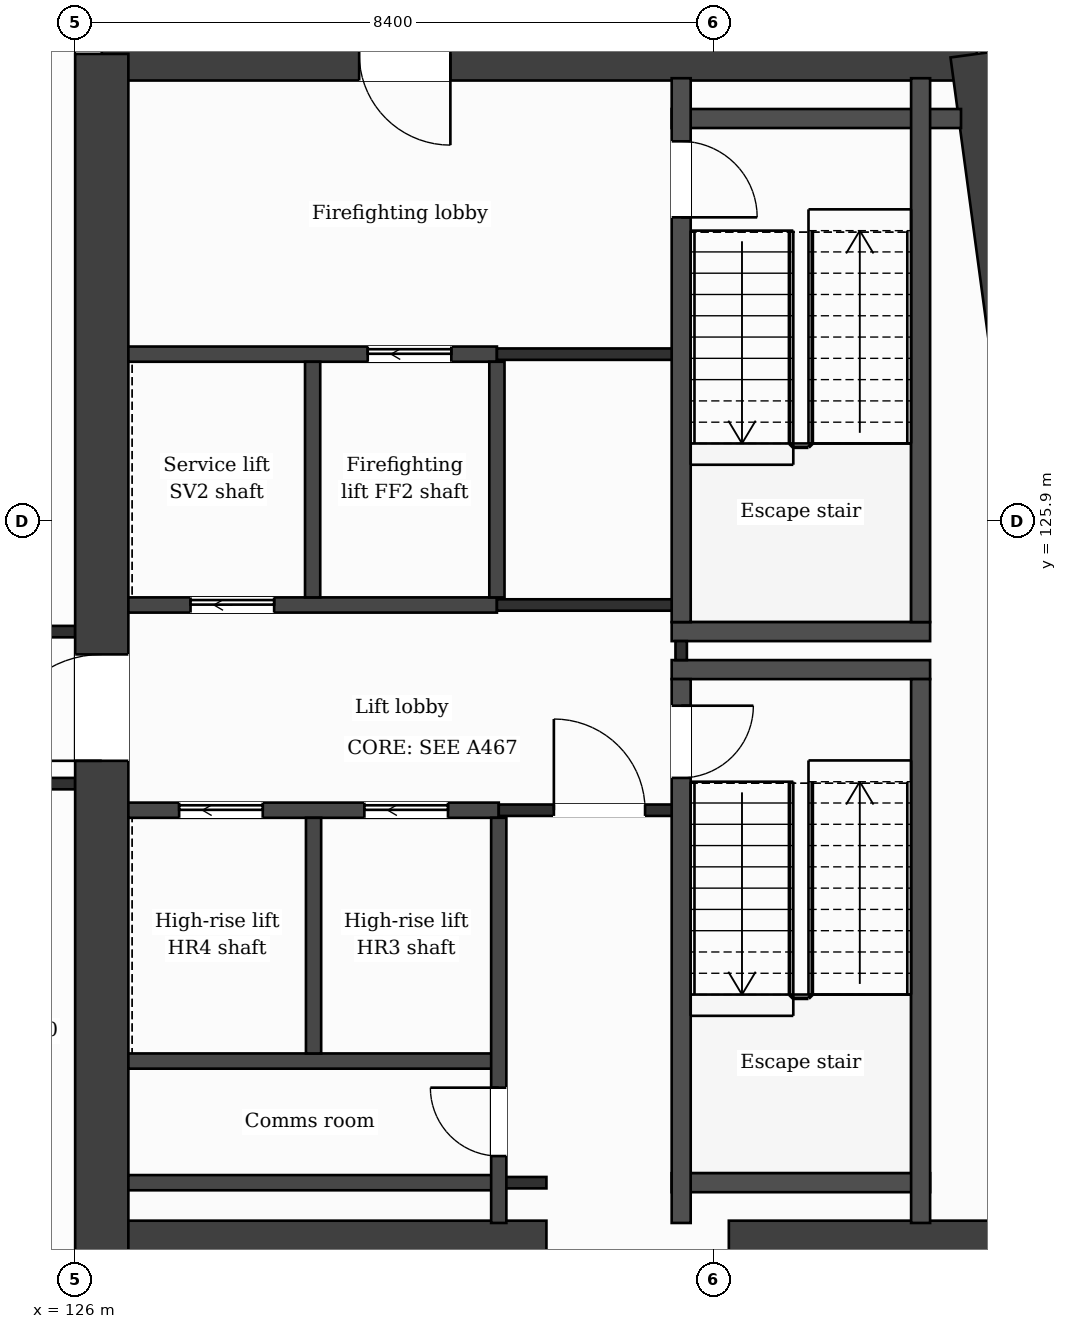
"""IFC4 building model, lengths in metres.
Left out: names, types, materials, properties, quantities, classifications, styles, units other than length and angle.
Written with IfcOpenShell. Run it as: python <this file> out.ifc"""

import sys

from ifc_helpers import new_model, si_unit, direction, frame, frame_2d, origin, place, context, subcontext, project, spatial, rectangle, extrude, element, fill, save


model = new_model("IFC4")
c1 = context("Model", 3, precision=1e-05, world=origin(), true_north=direction((0.0, 1.0)))
c2 = subcontext(c1, "Body", "Model", "MODEL_VIEW")
j1 = project(units=[si_unit("LENGTHUNIT", "METRE"), si_unit("PLANEANGLEUNIT", "RADIAN")], contexts=[c1])
p1 = place(None, origin())
s1 = spatial("IfcSite", under=j1, at=p1, CompositionType="ELEMENT")
p2 = place(p1, origin())
s2 = spatial("IfcBuilding", under=s1, at=p2, CompositionType="ELEMENT")
p3 = place(p2, frame((0.0, 0.0, 273.8)))
s3 = spatial("IfcBuildingStorey", under=s2, at=p3, CompositionType="ELEMENT", Elevation=273.8)
p4 = place(p3, frame((126.35, 132.05, 0.0), z_axis=(0.0, 0.0, 1.0), x_axis=(1.0, 0.0, 0.0)))
e1 = element("IfcWall", 1, at=p4, inside=s3, PredefinedType="SHEAR", context=c2, shape_type="SweptSolid", body=[
    extrude(rectangle(XDim=11.513, YDim=0.7, at=frame_2d((5.757, 0.0))), origin(), (0.0, 0.0, 1.0), 3.7),
])
p5 = place(p4, frame((3.386, 0.0, 0.0)))
e2 = element("IfcOpeningElement", 2, at=p5, cuts=e1, PredefinedType="OPENING", context=c2, shape_type="SweptSolid", body=[
    extrude(rectangle(XDim=1.2, YDim=2.1, at=frame_2d((0.6, 1.05))), frame((0.0, 0.36, 0.0), z_axis=(0.0, -1.0, 0.0), x_axis=(1.0, 0.0, 0.0)), (0.0, 0.0, 1.0), 0.72),
])
p6 = place(p3, frame((137.863, 132.05, 0.0), z_axis=(0.0, 0.0, 1.0), x_axis=(0.133406218907, -0.991061441464, 0.0)))
e3 = element("IfcWall", 3, at=p6, inside=s3, PredefinedType="SHEAR", context=c2, shape_type="SweptSolid", body=[
    extrude(rectangle(XDim=21.492, YDim=0.7, at=frame_2d((10.746, 0.0))), origin(), (0.0, 0.0, 1.0), 3.7),
])
p7 = place(p3, frame((126.35, 110.75, 0.0), z_axis=(0.0, 0.0, 1.0), x_axis=(0.0, 1.0, 0.0)))
e4 = element("IfcWall", 4, at=p7, inside=s3, PredefinedType="SHEAR", context=c2, shape_type="SweptSolid", body=[
    extrude(rectangle(XDim=21.3, YDim=0.7, at=frame_2d((10.65, 0.0))), origin(), (0.0, 0.0, 1.0), 3.7),
])
p8 = place(p7, frame((12.0, 0.0, 0.0)))
e5 = element("IfcOpeningElement", 5, at=p8, cuts=e4, PredefinedType="OPENING", context=c2, shape_type="SweptSolid", body=[
    extrude(rectangle(XDim=1.4, YDim=2.1, at=frame_2d((0.7, 1.05))), frame((0.0, 0.36, 0.0), z_axis=(0.0, -1.0, 0.0), x_axis=(1.0, 0.0, 0.0)), (0.0, 0.0, 1.0), 0.72),
])
p9 = place(p3, frame((126.7, 116.35, 0.0), z_axis=(0.0, 0.0, 1.0), x_axis=(1.0, 0.0, 0.0)))
e6 = element("IfcWall", 6, at=p9, inside=s3, PredefinedType="SHEAR", context=c2, shape_type="SweptSolid", body=[
    extrude(rectangle(XDim=5.5, YDim=0.7, at=frame_2d((2.75, 0.0))), origin(), (0.0, 0.0, 1.0), 3.7),
])
p10 = place(p3, frame((134.6, 116.35, 0.0), z_axis=(0.0, 0.0, 1.0), x_axis=(1.0, 0.0, 0.0)))
e7 = element("IfcWall", 7, at=p10, inside=s3, PredefinedType="SHEAR", context=c2, shape_type="SweptSolid", body=[
    extrude(rectangle(XDim=5.077, YDim=0.7, at=frame_2d((2.539, 0.0))), origin(), (0.0, 0.0, 1.0), 3.7),
])
p11 = place(p3, frame((126.7, 117.2, 0.0), z_axis=(0.0, 0.0, 1.0), x_axis=(1.0, 0.0, 0.0)))
e8 = element("IfcWall", 8, at=p11, inside=s3, PredefinedType="PARTITIONING", context=c2, shape_type="SweptSolid", body=[
    extrude(rectangle(XDim=4.873, YDim=0.2, at=frame_2d((2.437, 0.0))), origin(), (0.0, 0.0, 1.0), 3.38),
])
p12 = place(p3, frame((131.573, 117.2, 0.0), z_axis=(0.0, 0.0, 1.0), x_axis=(1.0, 0.0, 0.0)))
e9 = element("IfcWall", 9, at=p12, inside=s3, PredefinedType="PARTITIONING", context=c2, shape_type="SweptSolid", body=[
    extrude(rectangle(XDim=0.627, YDim=0.15, at=frame_2d((0.313, 0.0))), origin(), (0.0, 0.0, 1.0), 3.38),
])
p13 = place(p3, frame((133.848, 117.2, 0.0), z_axis=(0.0, 0.0, 1.0), x_axis=(1.0, 0.0, 0.0)))
e10 = element("IfcWall", 10, at=p13, inside=s3, PredefinedType="PARTITIONING", context=c2, shape_type="SweptSolid", body=[
    extrude(rectangle(XDim=3.4, YDim=0.25, at=frame_2d((1.7, 0.0))), origin(), (0.0, 0.0, 1.0), 3.38),
])
p14 = place(p3, frame((126.7, 118.8, 0.0), z_axis=(0.0, 0.0, 1.0), x_axis=(1.0, 0.0, 0.0)))
e11 = element("IfcWall", 11, at=p14, inside=s3, PredefinedType="PARTITIONING", context=c2, shape_type="SweptSolid", body=[
    extrude(rectangle(XDim=4.873, YDim=0.2, at=frame_2d((2.437, 0.0))), origin(), (0.0, 0.0, 1.0), 3.38),
])
p15 = place(p3, frame((126.7, 122.1, 0.0), z_axis=(0.0, 0.0, 1.0), x_axis=(1.0, 0.0, 0.0)))
e12 = element("IfcWall", 12, at=p15, inside=s3, PredefinedType="PARTITIONING", context=c2, shape_type="SweptSolid", body=[
    extrude(rectangle(XDim=4.873, YDim=0.2, at=frame_2d((2.437, 0.0))), origin(), (0.0, 0.0, 1.0), 3.38),
])
p16 = place(p15, frame((3.105, 0.0, 0.0)))
e13 = element("IfcOpeningElement", 13, at=p16, cuts=e12, PredefinedType="OPENING", context=c2, shape_type="SweptSolid", body=[
    extrude(rectangle(XDim=1.1, YDim=2.1, at=frame_2d((0.55, 1.05))), frame((0.0, 0.11, 0.0), z_axis=(0.0, -1.0, 0.0), x_axis=(1.0, 0.0, 0.0)), (0.0, 0.0, 1.0), 0.22),
])
p17 = place(p15, frame((0.668, 0.0, 0.0)))
e14 = element("IfcOpeningElement", 14, at=p17, cuts=e12, PredefinedType="OPENING", context=c2, shape_type="SweptSolid", body=[
    extrude(rectangle(XDim=1.1, YDim=2.1, at=frame_2d((0.55, 1.05))), frame((0.0, 0.11, 0.0), z_axis=(0.0, -1.0, 0.0), x_axis=(1.0, 0.0, 0.0)), (0.0, 0.0, 1.0), 0.22),
])
p18 = place(p3, frame((131.573, 122.1, 0.0), z_axis=(0.0, 0.0, 1.0), x_axis=(1.0, 0.0, 0.0)))
e15 = element("IfcWall", 15, at=p18, inside=s3, PredefinedType="PARTITIONING", context=c2, shape_type="SweptSolid", body=[
    extrude(rectangle(XDim=2.4, YDim=0.15, at=frame_2d((1.2, 0.0))), origin(), (0.0, 0.0, 1.0), 3.38),
])
p19 = place(p18, frame((0.725, 0.0, 0.0)))
e16 = element("IfcOpeningElement", 16, at=p19, cuts=e15, PredefinedType="OPENING", context=c2, shape_type="SweptSolid", body=[
    extrude(rectangle(XDim=1.2, YDim=2.1, at=frame_2d((0.6, 1.05))), frame((0.0, 0.085, 0.0), z_axis=(0.0, -1.0, 0.0), x_axis=(1.0, 0.0, 0.0)), (0.0, 0.0, 1.0), 0.17),
])
p20 = place(p3, frame((100.8, 122.45, 0.0), z_axis=(0.0, 0.0, 1.0), x_axis=(1.0, 0.0, 0.0)))
e17 = element("IfcWall", 17, at=p20, inside=s3, PredefinedType="PARTITIONING", context=c2, shape_type="SweptSolid", body=[
    extrude(rectangle(XDim=25.2, YDim=0.15, at=frame_2d((12.6, 0.0))), origin(), (0.0, 0.0, 1.0), 3.38),
])
p21 = place(p20, frame((5.55, 0.0, 0.0)))
e18 = element("IfcOpeningElement", 18, at=p21, cuts=e17, PredefinedType="OPENING", context=c2, shape_type="SweptSolid", body=[
    extrude(rectangle(XDim=1.0, YDim=2.1, at=frame_2d((0.5, 1.05))), frame((0.0, 0.085, 0.0), z_axis=(0.0, -1.0, 0.0), x_axis=(1.0, 0.0, 0.0)), (0.0, 0.0, 1.0), 0.17),
])
p22 = place(p20, frame((8.862, 0.0, 0.0)))
e19 = element("IfcOpeningElement", 19, at=p22, cuts=e17, PredefinedType="OPENING", context=c2, shape_type="SweptSolid", body=[
    extrude(rectangle(XDim=0.95, YDim=2.1, at=frame_2d((0.475, 1.05))), frame((0.0, 0.085, 0.0), z_axis=(0.0, -1.0, 0.0), x_axis=(1.0, 0.0, 0.0)), (0.0, 0.0, 1.0), 0.17),
])
p23 = place(p20, frame((15.2, 0.0, 0.0)))
e20 = element("IfcOpeningElement", 20, at=p23, cuts=e17, PredefinedType="OPENING", context=c2, shape_type="SweptSolid", body=[
    extrude(rectangle(XDim=0.95, YDim=2.1, at=frame_2d((0.475, 1.05))), frame((0.0, 0.085, 0.0), z_axis=(0.0, -1.0, 0.0), x_axis=(1.0, 0.0, 0.0)), (0.0, 0.0, 1.0), 0.17),
])
p24 = place(p20, frame((17.325, 0.0, 0.0)))
e21 = element("IfcOpeningElement", 21, at=p24, cuts=e17, PredefinedType="OPENING", context=c2, shape_type="SweptSolid", body=[
    extrude(rectangle(XDim=1.0, YDim=2.1, at=frame_2d((0.5, 1.05))), frame((0.0, 0.085, 0.0), z_axis=(0.0, -1.0, 0.0), x_axis=(1.0, 0.0, 0.0)), (0.0, 0.0, 1.0), 0.17),
])
p25 = place(p20, frame((23.862, 0.0, 0.0)))
e22 = element("IfcOpeningElement", 22, at=p25, cuts=e17, PredefinedType="OPENING", context=c2, shape_type="SweptSolid", body=[
    extrude(rectangle(XDim=0.95, YDim=2.1, at=frame_2d((0.475, 1.05))), frame((0.0, 0.085, 0.0), z_axis=(0.0, -1.0, 0.0), x_axis=(1.0, 0.0, 0.0)), (0.0, 0.0, 1.0), 0.17),
])
for number, where, z_axis, x_axis in (
    (23, (133.848, 123.95, 0.0), (0.0, 0.0, 1.0), (1.0, 0.0, 0.0)),
    (24, (133.848, 124.45, 0.0), (0.0, 0.0, 1.0), (1.0, 0.0, 0.0)),
):
    element("IfcWall", number, at=place(p3, frame(where, z_axis=z_axis, x_axis=x_axis)), inside=s3, PredefinedType="PARTITIONING", context=c2, shape_type="SweptSolid", body=[
        extrude(rectangle(XDim=3.4, YDim=0.25, at=frame_2d((1.7, 0.0))), origin(), (0.0, 0.0, 1.0), 3.38),
    ])
p26 = place(p3, frame((100.8, 124.45, 0.0), z_axis=(0.0, 0.0, 1.0), x_axis=(1.0, 0.0, 0.0)))
e25 = element("IfcWall", 25, at=p26, inside=s3, PredefinedType="PARTITIONING", context=c2, shape_type="SweptSolid", body=[
    extrude(rectangle(XDim=25.2, YDim=0.15, at=frame_2d((12.6, 0.0))), origin(), (0.0, 0.0, 1.0), 3.38),
])
p27 = place(p26, frame((6.125, 0.0, 0.0)))
e26 = element("IfcOpeningElement", 26, at=p27, cuts=e25, PredefinedType="OPENING", context=c2, shape_type="SweptSolid", body=[
    extrude(rectangle(XDim=1.0, YDim=2.1, at=frame_2d((0.5, 1.05))), frame((0.0, 0.085, 0.0), z_axis=(0.0, -1.0, 0.0), x_axis=(1.0, 0.0, 0.0)), (0.0, 0.0, 1.0), 0.17),
])
p28 = place(p26, frame((1.325, 0.0, 0.0)))
e27 = element("IfcOpeningElement", 27, at=p28, cuts=e25, PredefinedType="OPENING", context=c2, shape_type="SweptSolid", body=[
    extrude(rectangle(XDim=1.0, YDim=2.1, at=frame_2d((0.5, 1.05))), frame((0.0, 0.085, 0.0), z_axis=(0.0, -1.0, 0.0), x_axis=(1.0, 0.0, 0.0)), (0.0, 0.0, 1.0), 0.17),
])
p29 = place(p26, frame((11.43, 0.0, 0.0)))
e28 = element("IfcOpeningElement", 28, at=p29, cuts=e25, PredefinedType="OPENING", context=c2, shape_type="SweptSolid", body=[
    extrude(rectangle(XDim=1.0, YDim=2.1, at=frame_2d((0.5, 1.05))), frame((0.0, 0.085, 0.0), z_axis=(0.0, -1.0, 0.0), x_axis=(1.0, 0.0, 0.0)), (0.0, 0.0, 1.0), 0.17),
])
p30 = place(p26, frame((21.17, 0.0, 0.0)))
e29 = element("IfcOpeningElement", 29, at=p30, cuts=e25, PredefinedType="OPENING", context=c2, shape_type="SweptSolid", body=[
    extrude(rectangle(XDim=1.0, YDim=2.1, at=frame_2d((0.5, 1.05))), frame((0.0, 0.085, 0.0), z_axis=(0.0, -1.0, 0.0), x_axis=(1.0, 0.0, 0.0)), (0.0, 0.0, 1.0), 0.17),
])
p31 = place(p3, frame((126.7, 124.8, 0.0), z_axis=(0.0, 0.0, 1.0), x_axis=(1.0, 0.0, 0.0)))
e30 = element("IfcWall", 30, at=p31, inside=s3, PredefinedType="PARTITIONING", context=c2, shape_type="SweptSolid", body=[
    extrude(rectangle(XDim=4.849, YDim=0.2, at=frame_2d((2.424, 0.0))), origin(), (0.0, 0.0, 1.0), 3.38),
])
p32 = place(p31, frame((0.818, 0.0, 0.0)))
e31 = element("IfcOpeningElement", 31, at=p32, cuts=e30, PredefinedType="OPENING", context=c2, shape_type="SweptSolid", body=[
    extrude(rectangle(XDim=1.1, YDim=2.1, at=frame_2d((0.55, 1.05))), frame((0.0, 0.11, 0.0), z_axis=(0.0, -1.0, 0.0), x_axis=(1.0, 0.0, 0.0)), (0.0, 0.0, 1.0), 0.22),
])
p33 = place(p3, frame((131.549, 124.8, 0.0), z_axis=(0.0, 0.0, 1.0), x_axis=(1.0, 0.0, 0.0)))
e32 = element("IfcWall", 32, at=p33, inside=s3, PredefinedType="PARTITIONING", context=c2, shape_type="SweptSolid", body=[
    extrude(rectangle(XDim=2.549, YDim=0.15, at=frame_2d((1.275, 0.0))), origin(), (0.0, 0.0, 1.0), 3.38),
])
p34 = place(p3, frame((126.7, 128.1, 0.0), z_axis=(0.0, 0.0, 1.0), x_axis=(1.0, 0.0, 0.0)))
e33 = element("IfcWall", 33, at=p34, inside=s3, PredefinedType="PARTITIONING", context=c2, shape_type="SweptSolid", body=[
    extrude(rectangle(XDim=4.849, YDim=0.2, at=frame_2d((2.424, 0.0))), origin(), (0.0, 0.0, 1.0), 3.38),
])
p35 = place(p34, frame((3.149, 0.0, 0.0)))
e34 = element("IfcOpeningElement", 34, at=p35, cuts=e33, PredefinedType="OPENING", context=c2, shape_type="SweptSolid", body=[
    extrude(rectangle(XDim=1.1, YDim=2.1, at=frame_2d((0.55, 1.05))), frame((0.0, 0.11, 0.0), z_axis=(0.0, -1.0, 0.0), x_axis=(1.0, 0.0, 0.0)), (0.0, 0.0, 1.0), 0.22),
])
p36 = place(p3, frame((131.549, 128.1, 0.0), z_axis=(0.0, 0.0, 1.0), x_axis=(1.0, 0.0, 0.0)))
e35 = element("IfcWall", 35, at=p36, inside=s3, PredefinedType="PARTITIONING", context=c2, shape_type="SweptSolid", body=[
    extrude(rectangle(XDim=2.424, YDim=0.15, at=frame_2d((1.212, 0.0))), origin(), (0.0, 0.0, 1.0), 3.38),
])
p37 = place(p3, frame((133.848, 131.2, 0.0), z_axis=(0.0, 0.0, 1.0), x_axis=(1.0, 0.0, 0.0)))
e36 = element("IfcWall", 36, at=p37, inside=s3, PredefinedType="PARTITIONING", context=c2, shape_type="SweptSolid", body=[
    extrude(rectangle(XDim=3.807, YDim=0.25, at=frame_2d((1.903, 0.0))), origin(), (0.0, 0.0, 1.0), 3.38),
])
for number, where, z_axis, x_axis in (
    (37, (129.124, 124.9, 0.0), (0.0, 0.0, 1.0), (0.0, 1.0, 0.0)),
    (38, (129.136, 118.9, 0.0), (0.0, 0.0, 1.0), (0.0, 1.0, 0.0)),
    (39, (131.549, 124.9, 0.0), (0.0, 0.0, 1.0), (0.0, 1.0, 0.0)),
):
    element("IfcWall", number, at=place(p3, frame(where, z_axis=z_axis, x_axis=x_axis)), inside=s3, PredefinedType="PARTITIONING", context=c2, shape_type="SweptSolid", body=[
        extrude(rectangle(XDim=3.1, YDim=0.2, at=frame_2d((1.55, 0.0))), origin(), (0.0, 0.0, 1.0), 3.38),
    ])
p38 = place(p3, frame((131.573, 116.67, 0.0), z_axis=(0.0, 0.0, 1.0), x_axis=(0.0, 1.0, 0.0)))
e40 = element("IfcWall", 40, at=p38, inside=s3, PredefinedType="PARTITIONING", context=c2, shape_type="SweptSolid", body=[
    extrude(rectangle(XDim=5.33, YDim=0.2, at=frame_2d((2.665, 0.0))), origin(), (0.0, 0.0, 1.0), 3.38),
])
p39 = place(p38, frame((0.88, 0.0, 0.0)))
e41 = element("IfcOpeningElement", 41, at=p39, cuts=e40, PredefinedType="OPENING", context=c2, shape_type="SweptSolid", body=[
    extrude(rectangle(XDim=0.9, YDim=2.1, at=frame_2d((0.45, 1.05))), frame((0.0, 0.11, 0.0), z_axis=(0.0, -1.0, 0.0), x_axis=(1.0, 0.0, 0.0)), (0.0, 0.0, 1.0), 0.22),
])
p40 = place(p3, frame((133.973, 124.075, 0.0), z_axis=(0.0, 0.0, 1.0), x_axis=(0.0, 1.0, 0.0)))
e42 = element("IfcWall", 42, at=p40, inside=s3, PredefinedType="PARTITIONING", context=c2, shape_type="SweptSolid", body=[
    extrude(rectangle(XDim=0.25, YDim=0.15, at=frame_2d((0.125, 0.0))), origin(), (0.0, 0.0, 1.0), 3.38),
])
p41 = place(p3, frame((133.973, 116.67, 0.0), z_axis=(0.0, 0.0, 1.0), x_axis=(0.0, 1.0, 0.0)))
e43 = element("IfcWall", 43, at=p41, inside=s3, PredefinedType="PARTITIONING", context=c2, shape_type="SweptSolid", body=[
    extrude(rectangle(XDim=7.155, YDim=0.25, at=frame_2d((3.578, 0.0))), origin(), (0.0, 0.0, 1.0), 3.38),
])
p42 = place(p41, frame((5.855, 0.0, 0.0)))
e44 = element("IfcOpeningElement", 44, at=p42, cuts=e43, PredefinedType="OPENING", context=c2, shape_type="SweptSolid", body=[
    extrude(rectangle(XDim=0.95, YDim=2.1, at=frame_2d((0.475, 1.05))), frame((0.0, 0.135, 0.0), z_axis=(0.0, -1.0, 0.0), x_axis=(1.0, 0.0, 0.0)), (0.0, 0.0, 1.0), 0.27),
])
p43 = place(p3, frame((133.973, 124.575, 0.0), z_axis=(0.0, 0.0, 1.0), x_axis=(0.0, 1.0, 0.0)))
e45 = element("IfcWall", 45, at=p43, inside=s3, PredefinedType="PARTITIONING", context=c2, shape_type="SweptSolid", body=[
    extrude(rectangle(XDim=7.155, YDim=0.25, at=frame_2d((3.578, 0.0))), origin(), (0.0, 0.0, 1.0), 3.38),
])
p44 = place(p43, frame((5.325, 0.0, 0.0)))
e46 = element("IfcOpeningElement", 46, at=p44, cuts=e45, PredefinedType="OPENING", context=c2, shape_type="SweptSolid", body=[
    extrude(rectangle(XDim=1.0, YDim=2.1, at=frame_2d((0.5, 1.05))), frame((0.0, 0.135, 0.0), z_axis=(0.0, -1.0, 0.0), x_axis=(1.0, 0.0, 0.0)), (0.0, 0.0, 1.0), 0.27),
])
for number, where, z_axis, x_axis in (
    (47, (137.123, 116.67, 0.0), (0.0, 0.0, 1.0), (0.0, 1.0, 0.0)),
    (48, (137.123, 124.575, 0.0), (0.0, 0.0, 1.0), (0.0, 1.0, 0.0)),
):
    element("IfcWall", number, at=place(p3, frame(where, z_axis=z_axis, x_axis=x_axis)), inside=s3, PredefinedType="PARTITIONING", context=c2, shape_type="SweptSolid", body=[
        extrude(rectangle(XDim=7.155, YDim=0.25, at=frame_2d((3.578, 0.0))), origin(), (0.0, 0.0, 1.0), 3.38),
    ])
p45 = place(p19, origin())
e49 = element("IfcDoor", 49, at=p45, inside=s3, OperationType="SINGLE_SWING_LEFT", PredefinedType="DOOR", context=c2, shape_type="SweptSolid", body=[
    extrude(rectangle(XDim=1.2, YDim=2.1, at=frame_2d((0.6, 1.05))), frame((0.0, 0.025, 0.0), z_axis=(0.0, -1.0, 0.0), x_axis=(1.0, 0.0, 0.0)), (0.0, 0.0, 1.0), 0.05),
])
fill(e16, e49)
p46 = place(p16, origin())
e50 = element("IfcDoor", 50, at=p46, inside=s3, OperationType="SLIDING_TO_LEFT", PredefinedType="DOOR", context=c2, shape_type="SweptSolid", body=[
    extrude(rectangle(XDim=1.1, YDim=2.1, at=frame_2d((0.55, 1.05))), frame((0.0, 0.025, 0.0), z_axis=(0.0, -1.0, 0.0), x_axis=(1.0, 0.0, 0.0)), (0.0, 0.0, 1.0), 0.05),
])
fill(e13, e50)
p47 = place(p17, origin())
e51 = element("IfcDoor", 51, at=p47, inside=s3, OperationType="SLIDING_TO_LEFT", PredefinedType="DOOR", context=c2, shape_type="SweptSolid", body=[
    extrude(rectangle(XDim=1.1, YDim=2.1, at=frame_2d((0.55, 1.05))), frame((0.0, 0.025, 0.0), z_axis=(0.0, -1.0, 0.0), x_axis=(1.0, 0.0, 0.0)), (0.0, 0.0, 1.0), 0.05),
])
fill(e14, e51)
p48 = place(p35, origin())
e52 = element("IfcDoor", 52, at=p48, inside=s3, OperationType="SLIDING_TO_LEFT", PredefinedType="DOOR", context=c2, shape_type="SweptSolid", body=[
    extrude(rectangle(XDim=1.1, YDim=2.1, at=frame_2d((0.55, 1.05))), frame((0.0, 0.025, 0.0), z_axis=(0.0, -1.0, 0.0), x_axis=(1.0, 0.0, 0.0)), (0.0, 0.0, 1.0), 0.05),
])
fill(e34, e52)
p49 = place(p32, origin())
e53 = element("IfcDoor", 53, at=p49, inside=s3, OperationType="SLIDING_TO_LEFT", PredefinedType="DOOR", context=c2, shape_type="SweptSolid", body=[
    extrude(rectangle(XDim=1.1, YDim=2.1, at=frame_2d((0.55, 1.05))), frame((0.0, 0.025, 0.0), z_axis=(0.0, -1.0, 0.0), x_axis=(1.0, 0.0, 0.0)), (0.0, 0.0, 1.0), 0.05),
])
fill(e31, e53)
p50 = place(p42, origin())
e54 = element("IfcDoor", 54, at=p50, inside=s3, OperationType="SINGLE_SWING_RIGHT", PredefinedType="DOOR", context=c2, shape_type="SweptSolid", body=[
    extrude(rectangle(XDim=0.95, YDim=2.1, at=frame_2d((0.475, 1.05))), frame((0.0, 0.025, 0.0), z_axis=(0.0, -1.0, 0.0), x_axis=(1.0, 0.0, 0.0)), (0.0, 0.0, 1.0), 0.05),
])
fill(e44, e54)
p51 = place(p44, origin())
e55 = element("IfcDoor", 55, at=p51, inside=s3, OperationType="SINGLE_SWING_LEFT", PredefinedType="DOOR", context=c2, shape_type="SweptSolid", body=[
    extrude(rectangle(XDim=1.0, YDim=2.1, at=frame_2d((0.5, 1.05))), frame((0.0, 0.025, 0.0), z_axis=(0.0, -1.0, 0.0), x_axis=(1.0, 0.0, 0.0)), (0.0, 0.0, 1.0), 0.05),
])
fill(e46, e55)
p52 = place(p39, origin())
e56 = element("IfcDoor", 56, at=p52, inside=s3, OperationType="SINGLE_SWING_RIGHT", PredefinedType="DOOR", context=c2, shape_type="SweptSolid", body=[
    extrude(rectangle(XDim=0.9, YDim=2.1, at=frame_2d((0.45, 1.05))), frame((0.0, 0.025, 0.0), z_axis=(0.0, -1.0, 0.0), x_axis=(1.0, 0.0, 0.0)), (0.0, 0.0, 1.0), 0.05),
])
fill(e41, e56)
p53 = place(p5, origin())
e57 = element("IfcDoor", 57, at=p53, inside=s3, OperationType="SINGLE_SWING_RIGHT", PredefinedType="DOOR", context=c2, shape_type="SweptSolid", body=[
    extrude(rectangle(XDim=1.2, YDim=2.1, at=frame_2d((0.6, 1.05))), frame((0.0, 0.025, 0.0), z_axis=(0.0, -1.0, 0.0), x_axis=(1.0, 0.0, 0.0)), (0.0, 0.0, 1.0), 0.05),
])
fill(e2, e57)
p54 = place(p8, origin())
e58 = element("IfcDoor", 58, at=p54, inside=s3, OperationType="SINGLE_SWING_LEFT", PredefinedType="DOOR", context=c2, shape_type="SweptSolid", body=[
    extrude(rectangle(XDim=1.4, YDim=2.1, at=frame_2d((0.7, 1.05))), frame((0.0, 0.025, 0.0), z_axis=(0.0, -1.0, 0.0), x_axis=(1.0, 0.0, 0.0)), (0.0, 0.0, 1.0), 0.05),
])
fill(e5, e58)
save(model, sys.argv[1])
